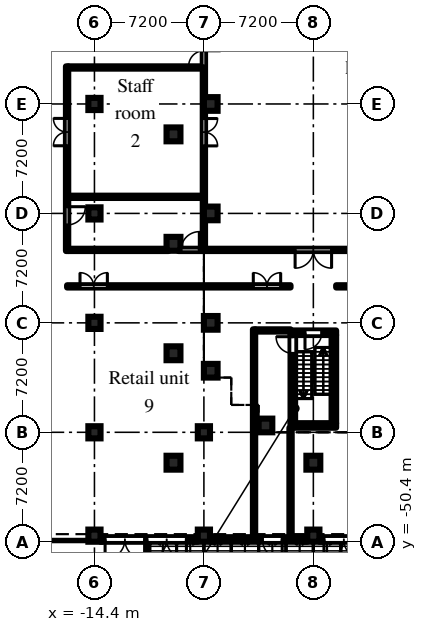
"""IFC4 building model, lengths in metres.
Left out: names, types, materials, properties, quantities, classifications, styles, units other than length and angle.
Written with IfcOpenShell. Run it as: python <this file> out.ifc"""

import sys

from ifc_helpers import new_model, si_unit, direction, frame, frame_2d, origin, origin_2d, place, context, subcontext, project, spatial, rectangle, hollow_circle, extrude, element, fill, save


model = new_model("IFC4")
c1 = context("Model", 3, precision=1e-05, world=origin(), true_north=direction((0.0, 1.0)))
c2 = subcontext(c1, "Body", "Model", "MODEL_VIEW")
j1 = project(units=[si_unit("LENGTHUNIT", "METRE"), si_unit("PLANEANGLEUNIT", "RADIAN")], contexts=[c1])
p1 = place(None, origin())
s1 = spatial("IfcSite", under=j1, at=p1, CompositionType="ELEMENT")
p2 = place(p1, origin())
s2 = spatial("IfcBuilding", under=s1, at=p2, CompositionType="ELEMENT")
p3 = place(p2, origin())
s3 = spatial("IfcBuildingStorey", under=s2, at=p3, CompositionType="ELEMENT", Elevation=0.0)
for number, where, z_axis, x_axis in (
    (1, (-6.75, -39.15, 0.0), (0.0, 0.0, 1.0), (1.0, 0.0, 0.0)),
    (2, (-6.75, -36.0, 0.0), (0.0, 0.0, 1.0), (1.0, 0.0, 0.0)),
    (3, (-6.75, -28.8, 0.0), (0.0, 0.0, 1.0), (1.0, 0.0, 0.0)),
    (4, (-6.75, -21.6, 0.0), (0.0, 0.0, 1.0), (1.0, 0.0, 0.0)),
    (5, (-3.15, -42.75, 0.0), (0.0, 0.0, 1.0), (1.0, 0.0, 0.0)),
):
    element("IfcColumn", number, at=place(p3, frame(where, z_axis=z_axis, x_axis=x_axis)), inside=s3, PredefinedType="COLUMN", context=c2, shape_type="SweptSolid", body=[
        extrude(rectangle(XDim=0.9, YDim=0.9, at=origin_2d()), origin(), (0.0, 0.0, 1.0), 7.2),
    ])
for number, where, z_axis, x_axis in (
    (6, (-14.4, -50.0, 0.0), (0.0, 0.0, 1.0), (1.0, 0.0, 0.0)),
    (7, (-14.4, -43.2, 0.0), (0.0, 0.0, 1.0), (1.0, 0.0, 0.0)),
    (8, (-14.4, -36.0, 0.0), (0.0, 0.0, 1.0), (1.0, 0.0, 0.0)),
    (9, (-14.4, -28.8, 0.0), (0.0, 0.0, 1.0), (1.0, 0.0, 0.0)),
    (10, (-14.4, -21.6, 0.0), (0.0, 0.0, 1.0), (1.0, 0.0, 0.0)),
    (11, (-7.2, -50.0, 0.0), (0.0, 0.0, 1.0), (1.0, 0.0, 0.0)),
    (12, (-7.2, -43.2, 0.0), (0.0, 0.0, 1.0), (1.0, 0.0, 0.0)),
    (13, (0.0, -50.0, 0.0), (0.0, 0.0, 1.0), (1.0, 0.0, 0.0)),
):
    element("IfcColumn", number, at=place(p3, frame(where, z_axis=z_axis, x_axis=x_axis)), inside=s3, PredefinedType="COLUMN", context=c2, shape_type="SweptSolid", body=[
        extrude(rectangle(XDim=0.8, YDim=0.8, at=origin_2d()), origin(), (0.0, 0.0, 1.0), 6.6),
    ])
for number, where, z_axis, x_axis in (
    (14, (-9.2, -23.6, 0.0), (0.0, 0.0, 1.0), (1.0, 0.0, 0.0)),
    (15, (-9.2, -30.8, 0.0), (0.0, 0.0, 1.0), (1.0, 0.0, 0.0)),
    (16, (-9.2, -38.0, 0.0), (0.0, 0.0, 1.0), (1.0, 0.0, 0.0)),
    (17, (-9.2, -45.2, 0.0), (0.0, 0.0, 1.0), (1.0, 0.0, 0.0)),
    (18, (0.0, -45.2, 0.0), (0.0, 0.0, 1.0), (1.0, 0.0, 0.0)),
):
    element("IfcColumn", number, at=place(p3, frame(where, z_axis=z_axis, x_axis=x_axis)), inside=s3, PredefinedType="COLUMN", context=c2, shape_type="SweptSolid", body=[
        extrude(hollow_circle(Radius=0.457, WallThickness=0.05, at=origin_2d()), origin(), (0.0, 0.0, 1.0), 7.5),
    ])
p4 = place(p3, frame((-14.0, -50.25, 0.0), z_axis=(0.0, 0.0, 1.0), x_axis=(1.0, 0.0, 0.0)))
e19 = element("IfcWall", 19, at=p4, inside=s3, PredefinedType="SOLIDWALL", context=c2, shape_type="SweptSolid", body=[
    extrude(rectangle(XDim=6.4, YDim=0.3, at=frame_2d((3.2, 0.0))), origin(), (0.0, 0.0, 1.0), 6.6),
])
p5 = place(p4, frame((0.3, 0.0, 0.0)))
e20 = element("IfcOpeningElement", 20, at=p5, cuts=e19, PredefinedType="OPENING", context=c2, shape_type="SweptSolid", body=[
    extrude(rectangle(XDim=2.6, YDim=2.4, at=frame_2d((1.3, 1.2))), frame((0.0, 0.16, 0.0), z_axis=(0.0, -1.0, 0.0), x_axis=(1.0, 0.0, 0.0)), (0.0, 0.0, 1.0), 0.32),
])
p6 = place(p4, frame((3.05, 0.0, 0.0)))
e21 = element("IfcOpeningElement", 21, at=p6, cuts=e19, PredefinedType="OPENING", context=c2, shape_type="SweptSolid", body=[
    extrude(rectangle(XDim=2.6, YDim=2.4, at=frame_2d((1.3, 1.2))), frame((0.0, 0.16, 0.0), z_axis=(0.0, -1.0, 0.0), x_axis=(1.0, 0.0, 0.0)), (0.0, 0.0, 1.0), 0.32),
])
p7 = place(p3, frame((-6.8, -50.25, 0.0), z_axis=(0.0, 0.0, 1.0), x_axis=(1.0, 0.0, 0.0)))
e22 = element("IfcWall", 22, at=p7, inside=s3, PredefinedType="SOLIDWALL", context=c2, shape_type="SweptSolid", body=[
    extrude(rectangle(XDim=6.4, YDim=0.3, at=frame_2d((3.2, 0.0))), origin(), (0.0, 0.0, 1.0), 6.6),
])
p8 = place(p7, frame((3.45, 0.0, 0.0)))
e23 = element("IfcOpeningElement", 23, at=p8, cuts=e22, PredefinedType="OPENING", context=c2, shape_type="SweptSolid", body=[
    extrude(rectangle(XDim=1.3, YDim=2.1, at=frame_2d((0.65, 1.05))), frame((0.0, 0.16, 0.0), z_axis=(0.0, -1.0, 0.0), x_axis=(1.0, 0.0, 0.0)), (0.0, 0.0, 1.0), 0.32),
])
p9 = place(p3, frame((0.4, -50.25, 0.0), z_axis=(0.0, 0.0, 1.0), x_axis=(1.0, 0.0, 0.0)))
e24 = element("IfcWall", 24, at=p9, inside=s3, PredefinedType="SOLIDWALL", context=c2, shape_type="SweptSolid", body=[
    extrude(rectangle(XDim=6.4, YDim=0.3, at=frame_2d((3.2, 0.0))), origin(), (0.0, 0.0, 1.0), 6.6),
])
p10 = place(p9, frame((0.3, 0.0, 0.0)))
e25 = element("IfcOpeningElement", 25, at=p10, cuts=e24, PredefinedType="OPENING", context=c2, shape_type="SweptSolid", body=[
    extrude(rectangle(XDim=2.6, YDim=2.4, at=frame_2d((1.3, 1.2))), frame((0.0, 0.16, 0.0), z_axis=(0.0, -1.0, 0.0), x_axis=(1.0, 0.0, 0.0)), (0.0, 0.0, 1.0), 0.32),
])
p11 = place(p3, frame((-1.5, -36.65, 0.0), z_axis=(0.0, 0.0, 1.0), x_axis=(1.0, 0.0, 0.0)))
e26 = element("IfcWall", 26, at=p11, inside=s3, PredefinedType="SHEAR", context=c2, shape_type="SweptSolid", body=[
    extrude(rectangle(XDim=3.0, YDim=0.3, at=frame_2d((1.5, 0.0))), origin(), (0.0, 0.0, 1.0), 6.6),
])
p12 = place(p11, frame((0.95, 0.0, 0.0)))
e27 = element("IfcOpeningElement", 27, at=p12, cuts=e26, PredefinedType="OPENING", context=c2, shape_type="SweptSolid", body=[
    extrude(rectangle(XDim=1.1, YDim=2.1, at=frame_2d((0.55, 1.05))), frame((0.0, 0.16, 0.0), z_axis=(0.0, -1.0, 0.0), x_axis=(1.0, 0.0, 0.0)), (0.0, 0.0, 1.0), 0.32),
])
p13 = place(p3, frame((-1.5, -42.75, 0.0), z_axis=(0.0, 0.0, 1.0), x_axis=(1.0, 0.0, 0.0)))
e28 = element("IfcWall", 28, at=p13, inside=s3, PredefinedType="SHEAR", context=c2, shape_type="SweptSolid", body=[
    extrude(rectangle(XDim=3.0, YDim=0.3, at=frame_2d((1.5, 0.0))), origin(), (0.0, 0.0, 1.0), 6.6),
])
p14 = place(p3, frame((-1.35, -36.8, 0.0), z_axis=(0.0, 0.0, 1.0), x_axis=(0.0, -1.0, 0.0)))
e29 = element("IfcWall", 29, at=p14, inside=s3, PredefinedType="SHEAR", context=c2, shape_type="SweptSolid", body=[
    extrude(rectangle(XDim=5.8, YDim=0.3, at=frame_2d((2.9, 0.0))), origin(), (0.0, 0.0, 1.0), 6.6),
])
p15 = place(p14, frame((0.11, 0.0, 0.0)))
e30 = element("IfcOpeningElement", 30, at=p15, cuts=e29, PredefinedType="OPENING", context=c2, shape_type="SweptSolid", body=[
    extrude(rectangle(XDim=1.1, YDim=2.1, at=frame_2d((0.55, 1.05))), frame((0.0, 0.16, 0.0), z_axis=(0.0, -1.0, 0.0), x_axis=(1.0, 0.0, 0.0)), (0.0, 0.0, 1.0), 0.32),
])
p16 = place(p3, frame((1.35, -36.8, 0.0), z_axis=(0.0, 0.0, 1.0), x_axis=(0.0, -1.0, 0.0)))
e31 = element("IfcWall", 31, at=p16, inside=s3, PredefinedType="SHEAR", context=c2, shape_type="SweptSolid", body=[
    extrude(rectangle(XDim=5.8, YDim=0.3, at=frame_2d((2.9, 0.0))), origin(), (0.0, 0.0, 1.0), 6.6),
])
p17 = place(p3, frame((-16.2, -33.6, 0.0), z_axis=(0.0, 0.0, 1.0), x_axis=(1.0, 0.0, 0.0)))
e32 = element("IfcWall", 32, at=p17, inside=s3, PredefinedType="PARTITIONING", context=c2, shape_type="SweptSolid", body=[
    extrude(rectangle(XDim=14.7, YDim=0.15, at=frame_2d((7.35, 0.0))), origin(), (0.0, 0.0, 1.0), 6.6),
])
p18 = place(p17, frame((0.85, 0.0, 0.0)))
e33 = element("IfcOpeningElement", 33, at=p18, cuts=e32, PredefinedType="OPENING", context=c2, shape_type="SweptSolid", body=[
    extrude(rectangle(XDim=1.8, YDim=2.1, at=frame_2d((0.9, 1.05))), frame((0.0, 0.085, 0.0), z_axis=(0.0, -1.0, 0.0), x_axis=(1.0, 0.0, 0.0)), (0.0, 0.0, 1.0), 0.17),
])
p19 = place(p17, frame((12.25, 0.0, 0.0)))
e34 = element("IfcOpeningElement", 34, at=p19, cuts=e32, PredefinedType="OPENING", context=c2, shape_type="SweptSolid", body=[
    extrude(rectangle(XDim=1.8, YDim=2.1, at=frame_2d((0.9, 1.05))), frame((0.0, 0.085, 0.0), z_axis=(0.0, -1.0, 0.0), x_axis=(1.0, 0.0, 0.0)), (0.0, 0.0, 1.0), 0.17),
])
p20 = place(p3, frame((-16.2, -31.275, 0.0), z_axis=(0.0, 0.0, 1.0), x_axis=(0.0, 1.0, 0.0)))
e35 = element("IfcWall", 35, at=p20, inside=s3, PredefinedType="PARTITIONING", context=c2, shape_type="SweptSolid", body=[
    extrude(rectangle(XDim=12.15, YDim=0.15, at=frame_2d((6.075, 0.0))), origin(), (0.0, 0.0, 1.0), 6.6),
])
p21 = place(p20, frame((1.717, 0.0, 0.0)))
e36 = element("IfcOpeningElement", 36, at=p21, cuts=e35, PredefinedType="OPENING", context=c2, shape_type="SweptSolid", body=[
    extrude(rectangle(XDim=1.2, YDim=2.1, at=frame_2d((0.6, 1.05))), frame((0.0, 0.085, 0.0), z_axis=(0.0, -1.0, 0.0), x_axis=(1.0, 0.0, 0.0)), (0.0, 0.0, 1.0), 0.17),
])
p22 = place(p20, frame((6.925, 0.0, 0.0)))
e37 = element("IfcOpeningElement", 37, at=p22, cuts=e35, PredefinedType="OPENING", context=c2, shape_type="SweptSolid", body=[
    extrude(rectangle(XDim=1.8, YDim=2.1, at=frame_2d((0.9, 1.05))), frame((0.0, 0.085, 0.0), z_axis=(0.0, -1.0, 0.0), x_axis=(1.0, 0.0, 0.0)), (0.0, 0.0, 1.0), 0.17),
])
p23 = place(p3, frame((-16.125, -31.2, 0.0), z_axis=(0.0, 0.0, 1.0), x_axis=(1.0, 0.0, 0.0)))
e38 = element("IfcWall", 38, at=p23, inside=s3, PredefinedType="PARTITIONING", context=c2, shape_type="SweptSolid", body=[
    extrude(rectangle(XDim=6.604, YDim=0.15, at=frame_2d((3.302, 0.0))), origin(), (0.0, 0.0, 1.0), 6.6),
])
p24 = place(p3, frame((-8.878, -31.2, 0.0), z_axis=(0.0, 0.0, 1.0), x_axis=(1.0, 0.0, 0.0)))
e39 = element("IfcWall", 39, at=p24, inside=s3, PredefinedType="PARTITIONING", context=c2, shape_type="SweptSolid", body=[
    extrude(rectangle(XDim=17.757, YDim=0.15, at=frame_2d((8.878, 0.0))), origin(), (0.0, 0.0, 1.0), 6.6),
])
p25 = place(p24, frame((7.678, 0.0, 0.0)))
e40 = element("IfcOpeningElement", 40, at=p25, cuts=e39, PredefinedType="OPENING", context=c2, shape_type="SweptSolid", body=[
    extrude(rectangle(XDim=2.4, YDim=2.1, at=frame_2d((1.2, 1.05))), frame((0.0, 0.085, 0.0), z_axis=(0.0, -1.0, 0.0), x_axis=(1.0, 0.0, 0.0)), (0.0, 0.0, 1.0), 0.17),
])
p26 = place(p24, frame((0.178, 0.0, 0.0)))
e41 = element("IfcOpeningElement", 41, at=p26, cuts=e39, PredefinedType="OPENING", context=c2, shape_type="SweptSolid", body=[
    extrude(rectangle(XDim=1.2, YDim=2.1, at=frame_2d((0.6, 1.05))), frame((0.0, 0.085, 0.0), z_axis=(0.0, -1.0, 0.0), x_axis=(1.0, 0.0, 0.0)), (0.0, 0.0, 1.0), 0.17),
])
for number, where, z_axis, x_axis in (
    (42, (-16.125, -27.708, 0.0), (0.0, 0.0, 1.0), (1.0, 0.0, 0.0)),
    (43, (-16.125, -19.2, 0.0), (0.0, 0.0, 1.0), (1.0, 0.0, 0.0)),
):
    element("IfcWall", number, at=place(p3, frame(where, z_axis=z_axis, x_axis=x_axis)), inside=s3, PredefinedType="PARTITIONING", context=c2, shape_type="SweptSolid", body=[
        extrude(rectangle(XDim=8.85, YDim=0.15, at=frame_2d((4.425, 0.0))), origin(), (0.0, 0.0, 1.0), 6.6),
    ])
p27 = place(p3, frame((-7.2, -31.125, 0.0), z_axis=(0.0, 0.0, 1.0), x_axis=(0.0, 1.0, 0.0)))
e44 = element("IfcWall", 44, at=p27, inside=s3, PredefinedType="PARTITIONING", context=c2, shape_type="SweptSolid", body=[
    extrude(rectangle(XDim=23.988, YDim=0.15, at=frame_2d((11.994, 0.0))), origin(), (0.0, 0.0, 1.0), 6.3),
])
p28 = place(p27, frame((12.025, 0.0, 0.0)))
e45 = element("IfcOpeningElement", 45, at=p28, cuts=e44, PredefinedType="OPENING", context=c2, shape_type="SweptSolid", body=[
    extrude(rectangle(XDim=1.0, YDim=2.1, at=frame_2d((0.5, 1.05))), frame((0.0, 0.085, 0.0), z_axis=(0.0, -1.0, 0.0), x_axis=(1.0, 0.0, 0.0)), (0.0, 0.0, 1.0), 0.17),
])
p29 = place(p27, frame((6.767, 0.0, 0.0)))
e46 = element("IfcOpeningElement", 46, at=p29, cuts=e44, PredefinedType="OPENING", context=c2, shape_type="SweptSolid", body=[
    extrude(rectangle(XDim=1.8, YDim=2.1, at=frame_2d((0.9, 1.05))), frame((0.0, 0.085, 0.0), z_axis=(0.0, -1.0, 0.0), x_axis=(1.0, 0.0, 0.0)), (0.0, 0.0, 1.0), 0.17),
])
p30 = place(p3, frame((-3.9, -50.22, 0.0), z_axis=(0.0, 0.0, 1.0), x_axis=(0.0, 1.0, 0.0)))
e47 = element("IfcWall", 47, at=p30, inside=s3, PredefinedType="PARTITIONING", context=c2, shape_type="SweptSolid", body=[
    extrude(rectangle(XDim=13.795, YDim=0.15, at=frame_2d((6.897, 0.0))), origin(), (0.0, 0.0, 1.0), 6.6),
])
p31 = place(p3, frame((-3.825, -36.5, 0.0), z_axis=(0.0, 0.0, 1.0), x_axis=(1.0, 0.0, 0.0)))
e48 = element("IfcWall", 48, at=p31, inside=s3, PredefinedType="PARTITIONING", context=c2, shape_type="SweptSolid", body=[
    extrude(rectangle(XDim=2.325, YDim=0.15, at=frame_2d((1.163, 0.0))), origin(), (0.0, 0.0, 1.0), 6.6),
])
p32 = place(p3, frame((-1.5, -50.22, 0.0), z_axis=(0.0, 0.0, 1.0), x_axis=(0.0, 1.0, 0.0)))
e49 = element("IfcWall", 49, at=p32, inside=s3, PredefinedType="PARTITIONING", context=c2, shape_type="SweptSolid", body=[
    extrude(rectangle(XDim=7.32, YDim=0.15, at=frame_2d((3.66, 0.0))), origin(), (0.0, 0.0, 1.0), 6.6),
])
p33 = place(p3, frame((1.5, -33.6, 0.0), z_axis=(0.0, 0.0, 1.0), x_axis=(1.0, 0.0, 0.0)))
e50 = element("IfcWall", 50, at=p33, inside=s3, PredefinedType="PARTITIONING", context=c2, shape_type="SweptSolid", body=[
    extrude(rectangle(XDim=14.7, YDim=0.15, at=frame_2d((7.35, 0.0))), origin(), (0.0, 0.0, 1.0), 6.6),
])
p34 = place(p33, frame((0.85, 0.0, 0.0)))
e51 = element("IfcOpeningElement", 51, at=p34, cuts=e50, PredefinedType="OPENING", context=c2, shape_type="SweptSolid", body=[
    extrude(rectangle(XDim=1.8, YDim=2.1, at=frame_2d((0.9, 1.05))), frame((0.0, 0.085, 0.0), z_axis=(0.0, -1.0, 0.0), x_axis=(1.0, 0.0, 0.0)), (0.0, 0.0, 1.0), 0.17),
])
p35 = place(p33, frame((12.25, 0.0, 0.0)))
e52 = element("IfcOpeningElement", 52, at=p35, cuts=e50, PredefinedType="OPENING", context=c2, shape_type="SweptSolid", body=[
    extrude(rectangle(XDim=1.8, YDim=2.1, at=frame_2d((0.9, 1.05))), frame((0.0, 0.085, 0.0), z_axis=(0.0, -1.0, 0.0), x_axis=(1.0, 0.0, 0.0)), (0.0, 0.0, 1.0), 0.17),
])
p36 = place(p5, frame((2.6, 0.0, 0.0), z_axis=(0.0, 0.0, 1.0), x_axis=(-1.0, 0.0, 0.0)))
e53 = element("IfcDoor", 53, at=p36, inside=s3, OperationType="DOUBLE_DOOR_DOUBLE_SWING", PredefinedType="DOOR", context=c2, shape_type="SweptSolid", body=[
    extrude(rectangle(XDim=2.6, YDim=2.4, at=frame_2d((1.3, 1.2))), frame((0.0, 0.025, 0.0), z_axis=(0.0, -1.0, 0.0), x_axis=(1.0, 0.0, 0.0)), (0.0, 0.0, 1.0), 0.05),
])
fill(e20, e53)
p37 = place(p6, frame((2.6, 0.0, 0.0), z_axis=(0.0, 0.0, 1.0), x_axis=(-1.0, 0.0, 0.0)))
e54 = element("IfcDoor", 54, at=p37, inside=s3, OperationType="DOUBLE_DOOR_DOUBLE_SWING", PredefinedType="DOOR", context=c2, shape_type="SweptSolid", body=[
    extrude(rectangle(XDim=2.6, YDim=2.4, at=frame_2d((1.3, 1.2))), frame((0.0, 0.025, 0.0), z_axis=(0.0, -1.0, 0.0), x_axis=(1.0, 0.0, 0.0)), (0.0, 0.0, 1.0), 0.05),
])
fill(e21, e54)
p38 = place(p8, frame((1.3, 0.0, 0.0), z_axis=(0.0, 0.0, 1.0), x_axis=(-1.0, 0.0, 0.0)))
e55 = element("IfcDoor", 55, at=p38, inside=s3, OperationType="SINGLE_SWING_LEFT", PredefinedType="DOOR", context=c2, shape_type="SweptSolid", body=[
    extrude(rectangle(XDim=1.3, YDim=2.1, at=frame_2d((0.65, 1.05))), frame((0.0, 0.025, 0.0), z_axis=(0.0, -1.0, 0.0), x_axis=(1.0, 0.0, 0.0)), (0.0, 0.0, 1.0), 0.05),
])
fill(e23, e55)
p39 = place(p10, frame((2.6, 0.0, 0.0), z_axis=(0.0, 0.0, 1.0), x_axis=(-1.0, 0.0, 0.0)))
e56 = element("IfcDoor", 56, at=p39, inside=s3, OperationType="DOUBLE_DOOR_DOUBLE_SWING", PredefinedType="DOOR", context=c2, shape_type="SweptSolid", body=[
    extrude(rectangle(XDim=2.6, YDim=2.4, at=frame_2d((1.3, 1.2))), frame((0.0, 0.025, 0.0), z_axis=(0.0, -1.0, 0.0), x_axis=(1.0, 0.0, 0.0)), (0.0, 0.0, 1.0), 0.05),
])
fill(e25, e56)
p40 = place(p12, frame((1.1, 0.0, 0.0), z_axis=(0.0, 0.0, 1.0), x_axis=(-1.0, 0.0, 0.0)))
e57 = element("IfcDoor", 57, at=p40, inside=s3, OperationType="SINGLE_SWING_RIGHT", PredefinedType="DOOR", context=c2, shape_type="SweptSolid", body=[
    extrude(rectangle(XDim=1.1, YDim=2.1, at=frame_2d((0.55, 1.05))), frame((0.0, 0.025, 0.0), z_axis=(0.0, -1.0, 0.0), x_axis=(1.0, 0.0, 0.0)), (0.0, 0.0, 1.0), 0.05),
])
fill(e27, e57)
p41 = place(p15, frame((1.1, 0.0, 0.0), z_axis=(0.0, 0.0, 1.0), x_axis=(-1.0, 0.0, 0.0)))
e58 = element("IfcDoor", 58, at=p41, inside=s3, OperationType="SINGLE_SWING_RIGHT", PredefinedType="DOOR", context=c2, shape_type="SweptSolid", body=[
    extrude(rectangle(XDim=1.1, YDim=2.1, at=frame_2d((0.55, 1.05))), frame((0.0, 0.025, 0.0), z_axis=(0.0, -1.0, 0.0), x_axis=(1.0, 0.0, 0.0)), (0.0, 0.0, 1.0), 0.05),
])
fill(e30, e58)
p42 = place(p28, origin())
e59 = element("IfcDoor", 59, at=p42, inside=s3, OperationType="SINGLE_SWING_LEFT", PredefinedType="DOOR", context=c2, shape_type="SweptSolid", body=[
    extrude(rectangle(XDim=1.0, YDim=2.1, at=frame_2d((0.5, 1.05))), frame((0.0, 0.025, 0.0), z_axis=(0.0, -1.0, 0.0), x_axis=(1.0, 0.0, 0.0)), (0.0, 0.0, 1.0), 0.05),
])
fill(e45, e59)
p43 = place(p25, frame((2.4, 0.0, 0.0), z_axis=(0.0, 0.0, 1.0), x_axis=(-1.0, 0.0, 0.0)))
e60 = element("IfcDoor", 60, at=p43, inside=s3, OperationType="DOUBLE_DOOR_DOUBLE_SWING", PredefinedType="DOOR", context=c2, shape_type="SweptSolid", body=[
    extrude(rectangle(XDim=2.4, YDim=2.1, at=frame_2d((1.2, 1.05))), frame((0.0, 0.025, 0.0), z_axis=(0.0, -1.0, 0.0), x_axis=(1.0, 0.0, 0.0)), (0.0, 0.0, 1.0), 0.05),
])
fill(e40, e60)
p44 = place(p21, frame((1.2, 0.0, 0.0), z_axis=(0.0, 0.0, 1.0), x_axis=(-1.0, 0.0, 0.0)))
e61 = element("IfcDoor", 61, at=p44, inside=s3, OperationType="SINGLE_SWING_LEFT", PredefinedType="DOOR", context=c2, shape_type="SweptSolid", body=[
    extrude(rectangle(XDim=1.2, YDim=2.1, at=frame_2d((0.6, 1.05))), frame((0.0, 0.025, 0.0), z_axis=(0.0, -1.0, 0.0), x_axis=(1.0, 0.0, 0.0)), (0.0, 0.0, 1.0), 0.05),
])
fill(e36, e61)
p45 = place(p26, origin())
e62 = element("IfcDoor", 62, at=p45, inside=s3, OperationType="SINGLE_SWING_RIGHT", PredefinedType="DOOR", context=c2, shape_type="SweptSolid", body=[
    extrude(rectangle(XDim=1.2, YDim=2.1, at=frame_2d((0.6, 1.05))), frame((0.0, 0.025, 0.0), z_axis=(0.0, -1.0, 0.0), x_axis=(1.0, 0.0, 0.0)), (0.0, 0.0, 1.0), 0.05),
])
fill(e41, e62)
p46 = place(p22, origin())
e63 = element("IfcDoor", 63, at=p46, inside=s3, OperationType="DOUBLE_DOOR_DOUBLE_SWING", PredefinedType="DOOR", context=c2, shape_type="SweptSolid", body=[
    extrude(rectangle(XDim=1.8, YDim=2.1, at=frame_2d((0.9, 1.05))), frame((0.0, 0.025, 0.0), z_axis=(0.0, -1.0, 0.0), x_axis=(1.0, 0.0, 0.0)), (0.0, 0.0, 1.0), 0.05),
])
fill(e37, e63)
p47 = place(p29, frame((1.8, 0.0, 0.0), z_axis=(0.0, 0.0, 1.0), x_axis=(-1.0, 0.0, 0.0)))
e64 = element("IfcDoor", 64, at=p47, inside=s3, OperationType="DOUBLE_DOOR_DOUBLE_SWING", PredefinedType="DOOR", context=c2, shape_type="SweptSolid", body=[
    extrude(rectangle(XDim=1.8, YDim=2.1, at=frame_2d((0.9, 1.05))), frame((0.0, 0.025, 0.0), z_axis=(0.0, -1.0, 0.0), x_axis=(1.0, 0.0, 0.0)), (0.0, 0.0, 1.0), 0.05),
])
fill(e46, e64)
p48 = place(p18, origin())
e65 = element("IfcDoor", 65, at=p48, inside=s3, OperationType="DOUBLE_DOOR_DOUBLE_SWING", PredefinedType="DOOR", context=c2, shape_type="SweptSolid", body=[
    extrude(rectangle(XDim=1.8, YDim=2.1, at=frame_2d((0.9, 1.05))), frame((0.0, 0.025, 0.0), z_axis=(0.0, -1.0, 0.0), x_axis=(1.0, 0.0, 0.0)), (0.0, 0.0, 1.0), 0.05),
])
fill(e33, e65)
p49 = place(p19, origin())
e66 = element("IfcDoor", 66, at=p49, inside=s3, OperationType="DOUBLE_DOOR_DOUBLE_SWING", PredefinedType="DOOR", context=c2, shape_type="SweptSolid", body=[
    extrude(rectangle(XDim=1.8, YDim=2.1, at=frame_2d((0.9, 1.05))), frame((0.0, 0.025, 0.0), z_axis=(0.0, -1.0, 0.0), x_axis=(1.0, 0.0, 0.0)), (0.0, 0.0, 1.0), 0.05),
])
fill(e34, e66)
save(model, sys.argv[1])
